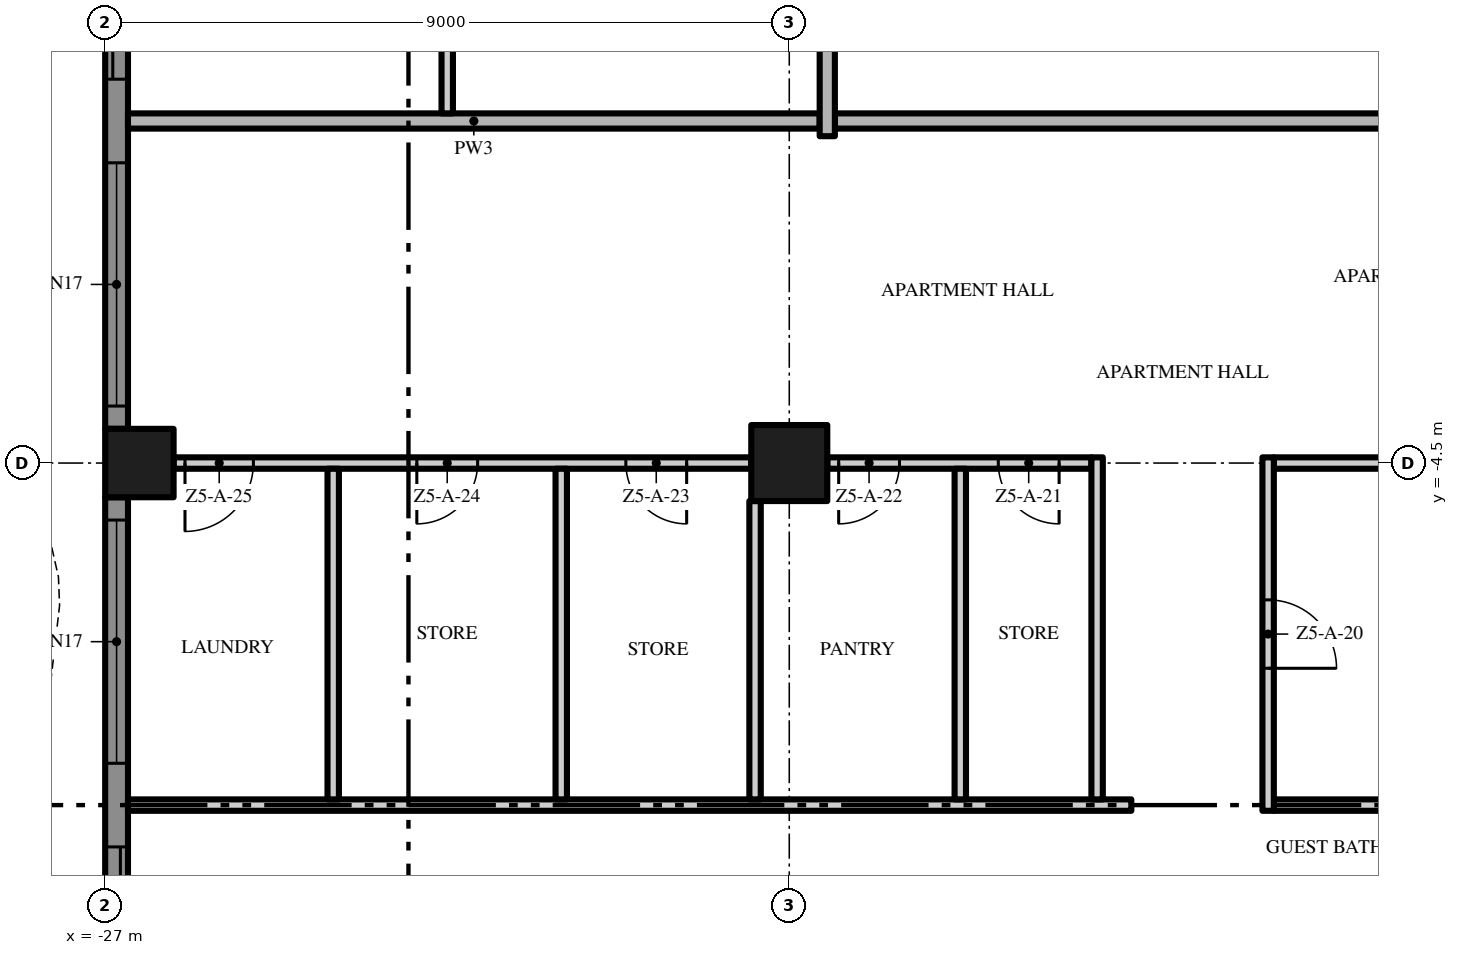
"""IFC4 building model, lengths in metres.
Left out: names, types, materials, properties, quantities, classifications, styles, units other than length and angle.
Written with IfcOpenShell. Run it as: python <this file> out.ifc"""

import sys

from ifc_helpers import new_model, si_unit, direction, frame, frame_2d, origin, origin_2d, place, context, subcontext, project, spatial, polyline, rectangle, outline, extrude, element, fill, save


model = new_model("IFC4")
c1 = context("Model", 3, precision=1e-05, world=origin(), true_north=direction((0.0, 1.0)))
c2 = subcontext(c1, "Body", "Model", "MODEL_VIEW")
j1 = project(units=[si_unit("LENGTHUNIT", "METRE"), si_unit("PLANEANGLEUNIT", "RADIAN")], contexts=[c1])
p1 = place(None, origin())
s1 = spatial("IfcSite", under=j1, at=p1, CompositionType="ELEMENT")
p2 = place(p1, origin())
s2 = spatial("IfcBuilding", under=s1, at=p2, CompositionType="ELEMENT")
p3 = place(p2, frame((0.0, 0.0, 246.4)))
s3 = spatial("IfcBuildingStorey", under=s2, at=p3, CompositionType="ELEMENT", Elevation=246.4)
p4 = place(p3, frame((-18.0, -4.5, 0.0), z_axis=(0.0, 0.0, 1.0), x_axis=(1.0, 0.0, 0.0)))
e1 = element("IfcColumn", 1, at=p4, inside=s3, PredefinedType="COLUMN", context=c2, shape_type="SweptSolid", body=[
    extrude(rectangle(XDim=1.0, YDim=1.0, at=origin_2d()), origin(), (0.0, 0.0, 1.0), 3.5),
])
p5 = place(p3, frame((-26.55, -4.5, 0.0), z_axis=(0.0, 0.0, 1.0), x_axis=(1.0, 0.0, 0.0)))
e2 = element("IfcColumn", 2, at=p5, inside=s3, PredefinedType="COLUMN", context=c2, shape_type="SweptSolid", body=[
    extrude(rectangle(XDim=0.9, YDim=0.9, at=origin_2d()), origin(), (0.0, 0.0, 1.0), 3.5),
])
p6 = place(p3, frame((-26.85, -4.05, 0.0), z_axis=(0.0, 0.0, 1.0), x_axis=(0.0, 1.0, 0.0)))
e3 = element("IfcWall", 3, at=p6, inside=s3, PredefinedType="SOLIDWALL", context=c2, shape_type="SweptSolid", body=[
    extrude(rectangle(XDim=8.1, YDim=0.3, at=frame_2d((4.05, 0.0))), origin(), (0.0, 0.0, 1.0), 3.5),
])
p7 = place(p6, frame((4.6, 0.0, 0.0)))
e4 = element("IfcOpeningElement", 4, at=p7, cuts=e3, PredefinedType="OPENING", context=c2, shape_type="SweptSolid", body=[
    extrude(rectangle(XDim=3.2, YDim=2.4, at=frame_2d((1.6, 1.2))), frame((0.0, 0.16, 0.0), z_axis=(0.0, -1.0, 0.0), x_axis=(1.0, 0.0, 0.0)), (0.0, 0.0, 1.0), 0.32),
])
p8 = place(p6, frame((0.3, 0.0, 0.45)))
e5 = element("IfcOpeningElement", 5, at=p8, cuts=e3, PredefinedType="OPENING", context=c2, shape_type="SweptSolid", body=[
    extrude(rectangle(XDim=3.2, YDim=2.65, at=frame_2d((1.6, 1.325))), frame((0.0, 0.16, 0.0), z_axis=(0.0, -1.0, 0.0), x_axis=(1.0, 0.0, 0.0)), (0.0, 0.0, 1.0), 0.32),
])
p9 = place(p3, frame((-26.85, -13.05, 0.0), z_axis=(0.0, 0.0, 1.0), x_axis=(0.0, 1.0, 0.0)))
e6 = element("IfcWall", 6, at=p9, inside=s3, PredefinedType="SOLIDWALL", context=c2, shape_type="SweptSolid", body=[
    extrude(rectangle(XDim=8.1, YDim=0.3, at=frame_2d((4.05, 0.0))), origin(), (0.0, 0.0, 1.0), 3.5),
])
p10 = place(p9, frame((4.6, 0.0, 0.45)))
e7 = element("IfcOpeningElement", 7, at=p10, cuts=e6, PredefinedType="OPENING", context=c2, shape_type="SweptSolid", body=[
    extrude(rectangle(XDim=3.2, YDim=2.65, at=frame_2d((1.6, 1.325))), frame((0.0, 0.16, 0.0), z_axis=(0.0, -1.0, 0.0), x_axis=(1.0, 0.0, 0.0)), (0.0, 0.0, 1.0), 0.32),
])
p11 = place(p9, frame((0.3, 0.0, 0.0)))
e8 = element("IfcOpeningElement", 8, at=p11, cuts=e6, PredefinedType="OPENING", context=c2, shape_type="SweptSolid", body=[
    extrude(rectangle(XDim=3.2, YDim=2.4, at=frame_2d((1.6, 1.2))), frame((0.0, 0.16, 0.0), z_axis=(0.0, -1.0, 0.0), x_axis=(1.0, 0.0, 0.0)), (0.0, 0.0, 1.0), 0.32),
])
p12 = place(p3, origin())
e9 = element("IfcWall", 9, at=p12, inside=s3, PredefinedType="USERDEFINED", context=c2, shape_type="SweptSolid", body=[
    extrude(outline(polyline([(-29.649, 18.0), (-29.985, 16.5), (-30.0, 16.125), (-29.869, 15.0), (-29.345, 13.5), (-28.612, 12.0), (-27.951, 10.5), (-27.615, 9.0), (-27.6, 8.625), (-27.731, 7.5), (-28.255, 6.0), (-28.988, 4.5), (-29.649, 3.0), (-29.985, 1.5), (-30.0, 1.125), (-29.869, 0.0), (-29.345, -1.5), (-28.612, -3.0), (-27.951, -4.5), (-27.615, -6.0), (-27.6, -6.375), (-27.731, -7.5), (-28.255, -9.0), (-28.988, -10.5), (-29.649, -12.0), (-29.985, -13.5), (-30.0, -13.875), (-29.869, -15.0), (-29.345, -16.5), (-28.612, -18.0), (-28.388, -17.89), (-29.114, -16.404), (-29.624, -14.944), (-29.749, -13.865), (-29.736, -13.533), (-29.41, -12.079), (-28.761, -10.605), (-28.024, -9.096), (-27.486, -7.556), (-27.349, -6.385), (-27.366, -5.967), (-27.713, -4.421), (-28.385, -2.895), (-29.114, -1.404), (-29.624, 0.056), (-29.749, 1.135), (-29.736, 1.467), (-29.41, 2.921), (-28.761, 4.395), (-28.024, 5.904), (-27.486, 7.444), (-27.349, 8.615), (-27.366, 9.033), (-27.713, 10.579), (-28.385, 12.105), (-29.114, 13.596), (-29.624, 15.056), (-29.749, 16.135), (-29.736, 16.467), (-29.405, 17.945), (-29.649, 18.0)])), origin(), (0.0, 0.0, 1.0), 0.9),
])
p13 = place(p3, frame((-26.7, -9.0, 0.0), z_axis=(0.0, 0.0, 1.0), x_axis=(1.0, 0.0, 0.0)))
e10 = element("IfcWall", 10, at=p13, inside=s3, PredefinedType="PARTITIONING", context=c2, shape_type="SweptSolid", body=[
    extrude(rectangle(XDim=13.2, YDim=0.15, at=frame_2d((6.6, 0.0))), origin(), (0.0, 0.0, 1.0), 3.5),
])
p14 = place(p3, frame((-11.625, -9.0, 0.0), z_axis=(0.0, 0.0, 1.0), x_axis=(1.0, 0.0, 0.0)))
e11 = element("IfcWall", 11, at=p14, inside=s3, PredefinedType="PARTITIONING", context=c2, shape_type="SweptSolid", body=[
    extrude(rectangle(XDim=11.525, YDim=0.15, at=frame_2d((5.763, 0.0))), origin(), (0.0, 0.0, 1.0), 3.5),
])
p15 = place(p14, frame((4.675, 0.0, 0.0)))
e12 = element("IfcOpeningElement", 12, at=p15, cuts=e11, PredefinedType="OPENING", context=c2, shape_type="SweptSolid", body=[
    extrude(rectangle(XDim=1.0, YDim=2.4, at=frame_2d((0.5, 1.2))), frame((0.0, 0.085, 0.0), z_axis=(0.0, -1.0, 0.0), x_axis=(1.0, 0.0, 0.0)), (0.0, 0.0, 1.0), 0.17),
])
p16 = place(p3, frame((-18.5, -4.5, 0.0), z_axis=(0.0, 0.0, 1.0), x_axis=(-1.0, 0.0, 0.0)))
e13 = element("IfcWall", 13, at=p16, inside=s3, PredefinedType="PARTITIONING", context=c2, shape_type="SweptSolid", body=[
    extrude(rectangle(XDim=7.6, YDim=0.15, at=frame_2d((3.8, 0.0))), origin(), (0.0, 0.0, 1.0), 3.5),
])
p17 = place(p16, frame((0.85, 0.0, 0.0)))
e14 = element("IfcOpeningElement", 14, at=p17, cuts=e13, PredefinedType="OPENING", context=c2, shape_type="SweptSolid", body=[
    extrude(rectangle(XDim=0.8, YDim=2.0, at=frame_2d((0.4, 1.0))), frame((0.0, 0.085, 0.0), z_axis=(0.0, -1.0, 0.0), x_axis=(1.0, 0.0, 0.0)), (0.0, 0.0, 1.0), 0.17),
])
p18 = place(p16, frame((3.6, 0.0, 0.0)))
e15 = element("IfcOpeningElement", 15, at=p18, cuts=e13, PredefinedType="OPENING", context=c2, shape_type="SweptSolid", body=[
    extrude(rectangle(XDim=0.8, YDim=2.0, at=frame_2d((0.4, 1.0))), frame((0.0, 0.085, 0.0), z_axis=(0.0, -1.0, 0.0), x_axis=(1.0, 0.0, 0.0)), (0.0, 0.0, 1.0), 0.17),
])
p19 = place(p16, frame((6.55, 0.0, 0.0)))
e16 = element("IfcOpeningElement", 16, at=p19, cuts=e13, PredefinedType="OPENING", context=c2, shape_type="SweptSolid", body=[
    extrude(rectangle(XDim=0.9, YDim=2.1, at=frame_2d((0.45, 1.05))), frame((0.0, 0.085, 0.0), z_axis=(0.0, -1.0, 0.0), x_axis=(1.0, 0.0, 0.0)), (0.0, 0.0, 1.0), 0.17),
])
p20 = place(p3, frame((-14.025, -4.5, 0.0), z_axis=(0.0, 0.0, 1.0), x_axis=(-1.0, 0.0, 0.0)))
e17 = element("IfcWall", 17, at=p20, inside=s3, PredefinedType="PARTITIONING", context=c2, shape_type="SweptSolid", body=[
    extrude(rectangle(XDim=3.475, YDim=0.15, at=frame_2d((1.738, 0.0))), origin(), (0.0, 0.0, 1.0), 3.5),
])
p21 = place(p20, frame((0.425, 0.0, 0.0)))
e18 = element("IfcOpeningElement", 18, at=p21, cuts=e17, PredefinedType="OPENING", context=c2, shape_type="SweptSolid", body=[
    extrude(rectangle(XDim=0.8, YDim=2.0, at=frame_2d((0.4, 1.0))), frame((0.0, 0.085, 0.0), z_axis=(0.0, -1.0, 0.0), x_axis=(1.0, 0.0, 0.0)), (0.0, 0.0, 1.0), 0.17),
])
p22 = place(p20, frame((2.525, 0.0, 0.0)))
e19 = element("IfcOpeningElement", 19, at=p22, cuts=e17, PredefinedType="OPENING", context=c2, shape_type="SweptSolid", body=[
    extrude(rectangle(XDim=0.8, YDim=2.0, at=frame_2d((0.4, 1.0))), frame((0.0, 0.085, 0.0), z_axis=(0.0, -1.0, 0.0), x_axis=(1.0, 0.0, 0.0)), (0.0, 0.0, 1.0), 0.17),
])
p23 = place(p3, frame((-11.625, -4.5, 0.0), z_axis=(0.0, 0.0, 1.0), x_axis=(1.0, 0.0, 0.0)))
e20 = element("IfcWall", 20, at=p23, inside=s3, PredefinedType="PARTITIONING", context=c2, shape_type="SweptSolid", body=[
    extrude(rectangle(XDim=2.125, YDim=0.15, at=frame_2d((1.062, 0.0))), origin(), (0.0, 0.0, 1.0), 3.5),
])
p24 = place(p3, frame((17.4, 0.0, 0.0), z_axis=(0.0, 0.0, 1.0), x_axis=(-1.0, 0.0, 0.0)))
e21 = element("IfcWall", 21, at=p24, inside=s3, PredefinedType="PARTITIONING", context=c2, shape_type="SweptSolid", body=[
    extrude(rectangle(XDim=34.8, YDim=0.2, at=frame_2d((17.4, 0.0))), origin(), (0.0, 0.0, 1.0), 3.5),
])
p25 = place(p24, frame((25.65, 0.0, 0.0)))
e22 = element("IfcOpeningElement", 22, at=p25, cuts=e21, PredefinedType="OPENING", context=c2, shape_type="SweptSolid", body=[
    extrude(rectangle(XDim=1.5, YDim=2.4, at=frame_2d((0.75, 1.2))), frame((0.0, 0.11, 0.0), z_axis=(0.0, -1.0, 0.0), x_axis=(1.0, 0.0, 0.0)), (0.0, 0.0, 1.0), 0.22),
])
p26 = place(p24, frame((7.65, 0.0, 0.0)))
e23 = element("IfcOpeningElement", 23, at=p26, cuts=e21, PredefinedType="OPENING", context=c2, shape_type="SweptSolid", body=[
    extrude(rectangle(XDim=1.5, YDim=2.4, at=frame_2d((0.75, 1.2))), frame((0.0, 0.11, 0.0), z_axis=(0.0, -1.0, 0.0), x_axis=(1.0, 0.0, 0.0)), (0.0, 0.0, 1.0), 0.22),
])
p27 = place(p3, frame((-26.7, 0.0, 0.0), z_axis=(0.0, 0.0, 1.0), x_axis=(1.0, 0.0, 0.0)))
e24 = element("IfcWall", 24, at=p27, inside=s3, PredefinedType="PARTITIONING", context=c2, shape_type="SweptSolid", body=[
    extrude(rectangle(XDim=9.1, YDim=0.2, at=frame_2d((4.55, 0.0))), origin(), (0.0, 0.0, 1.0), 3.5),
])
p28 = place(p3, frame((-24.0, -8.925, 0.0), z_axis=(0.0, 0.0, 1.0), x_axis=(0.0, 1.0, 0.0)))
e25 = element("IfcWall", 25, at=p28, inside=s3, PredefinedType="PARTITIONING", context=c2, shape_type="SweptSolid", body=[
    extrude(rectangle(XDim=4.35, YDim=0.15, at=frame_2d((2.175, 0.0))), origin(), (0.0, 0.0, 1.0), 3.5),
])
p29 = place(p3, frame((-22.5, 0.1, 0.0), z_axis=(0.0, 0.0, 1.0), x_axis=(0.0, 1.0, 0.0)))
e26 = element("IfcWall", 26, at=p29, inside=s3, PredefinedType="PARTITIONING", context=c2, shape_type="SweptSolid", body=[
    extrude(rectangle(XDim=17.45, YDim=0.15, at=frame_2d((8.725, 0.0))), origin(), (0.0, 0.0, 1.0), 3.5),
])
p30 = place(p29, frame((1.65, 0.0, 0.0)))
e27 = element("IfcOpeningElement", 27, at=p30, cuts=e26, PredefinedType="OPENING", context=c2, shape_type="SweptSolid", body=[
    extrude(rectangle(XDim=1.0, YDim=2.4, at=frame_2d((0.5, 1.2))), frame((0.0, 0.085, 0.0), z_axis=(0.0, -1.0, 0.0), x_axis=(1.0, 0.0, 0.0)), (0.0, 0.0, 1.0), 0.17),
])
p31 = place(p29, frame((5.0, 0.0, 0.0)))
e28 = element("IfcOpeningElement", 28, at=p31, cuts=e26, PredefinedType="OPENING", context=c2, shape_type="SweptSolid", body=[
    extrude(rectangle(XDim=1.0, YDim=2.4, at=frame_2d((0.5, 1.2))), frame((0.0, 0.085, 0.0), z_axis=(0.0, -1.0, 0.0), x_axis=(1.0, 0.0, 0.0)), (0.0, 0.0, 1.0), 0.17),
])
p32 = place(p29, frame((11.4, 0.0, 0.0)))
e29 = element("IfcOpeningElement", 29, at=p32, cuts=e26, PredefinedType="OPENING", context=c2, shape_type="SweptSolid", body=[
    extrude(rectangle(XDim=1.8, YDim=2.4, at=frame_2d((0.9, 1.2))), frame((0.0, 0.085, 0.0), z_axis=(0.0, -1.0, 0.0), x_axis=(1.0, 0.0, 0.0)), (0.0, 0.0, 1.0), 0.17),
])
p33 = place(p3, frame((-21.0, -8.925, 0.0), z_axis=(0.0, 0.0, 1.0), x_axis=(0.0, 1.0, 0.0)))
e30 = element("IfcWall", 30, at=p33, inside=s3, PredefinedType="PARTITIONING", context=c2, shape_type="SweptSolid", body=[
    extrude(rectangle(XDim=4.35, YDim=0.15, at=frame_2d((2.175, 0.0))), origin(), (0.0, 0.0, 1.0), 3.5),
])
p34 = place(p3, frame((-18.45, -8.925, 0.0), z_axis=(0.0, 0.0, 1.0), x_axis=(0.0, 1.0, 0.0)))
e31 = element("IfcWall", 31, at=p34, inside=s3, PredefinedType="PARTITIONING", context=c2, shape_type="SweptSolid", body=[
    extrude(rectangle(XDim=3.925, YDim=0.15, at=frame_2d((1.962, 0.0))), origin(), (0.0, 0.0, 1.0), 3.5),
])
p35 = place(p3, frame((-17.5, -0.2, 0.0), z_axis=(0.0, 0.0, 1.0), x_axis=(0.0, 1.0, 0.0)))
e32 = element("IfcWall", 32, at=p35, inside=s3, PredefinedType="PARTITIONING", context=c2, shape_type="SweptSolid", body=[
    extrude(rectangle(XDim=4.2, YDim=0.2, at=frame_2d((2.1, 0.0))), origin(), (0.0, 0.0, 1.0), 3.5),
])
p36 = place(p3, frame((-15.75, -8.925, 0.0), z_axis=(0.0, 0.0, 1.0), x_axis=(0.0, 1.0, 0.0)))
e33 = element("IfcWall", 33, at=p36, inside=s3, PredefinedType="PARTITIONING", context=c2, shape_type="SweptSolid", body=[
    extrude(rectangle(XDim=4.35, YDim=0.15, at=frame_2d((2.175, 0.0))), origin(), (0.0, 0.0, 1.0), 3.5),
])
p37 = place(p3, frame((-13.95, -8.925, 0.0), z_axis=(0.0, 0.0, 1.0), x_axis=(0.0, 1.0, 0.0)))
e34 = element("IfcWall", 34, at=p37, inside=s3, PredefinedType="PARTITIONING", context=c2, shape_type="SweptSolid", body=[
    extrude(rectangle(XDim=4.5, YDim=0.15, at=frame_2d((2.25, 0.0))), origin(), (0.0, 0.0, 1.0), 3.5),
])
p38 = place(p3, frame((-11.7, -4.425, 0.0), z_axis=(0.0, 0.0, 1.0), x_axis=(0.0, -1.0, 0.0)))
e35 = element("IfcWall", 35, at=p38, inside=s3, PredefinedType="PARTITIONING", context=c2, shape_type="SweptSolid", body=[
    extrude(rectangle(XDim=4.65, YDim=0.15, at=frame_2d((2.325, 0.0))), origin(), (0.0, 0.0, 1.0), 3.5),
])
p39 = place(p38, frame((1.875, 0.0, 0.0)))
e36 = element("IfcOpeningElement", 36, at=p39, cuts=e35, PredefinedType="OPENING", context=c2, shape_type="SweptSolid", body=[
    extrude(rectangle(XDim=0.9, YDim=2.1, at=frame_2d((0.45, 1.05))), frame((0.0, 0.085, 0.0), z_axis=(0.0, -1.0, 0.0), x_axis=(1.0, 0.0, 0.0)), (0.0, 0.0, 1.0), 0.17),
])
p40 = place(p7, origin())
e37 = element("IfcDoor", 37, at=p40, inside=s3, OperationType="SINGLE_SWING_LEFT", PredefinedType="DOOR", context=c2, shape_type="SweptSolid", body=[
    extrude(rectangle(XDim=3.2, YDim=2.4, at=frame_2d((1.6, 1.2))), frame((0.0, 0.025, 0.0), z_axis=(0.0, -1.0, 0.0), x_axis=(1.0, 0.0, 0.0)), (0.0, 0.0, 1.0), 0.05),
])
fill(e4, e37)
p41 = place(p8, origin())
e38 = element("IfcWindow", 38, at=p41, inside=s3, PartitioningType="SINGLE_PANEL", PredefinedType="WINDOW", context=c2, shape_type="SweptSolid", body=[
    extrude(rectangle(XDim=3.2, YDim=2.65, at=frame_2d((1.6, 1.325))), frame((0.0, 0.03, 0.0), z_axis=(0.0, -1.0, 0.0), x_axis=(1.0, 0.0, 0.0)), (0.0, 0.0, 1.0), 0.06),
])
fill(e5, e38)
p42 = place(p10, origin())
e39 = element("IfcWindow", 39, at=p42, inside=s3, PartitioningType="SINGLE_PANEL", PredefinedType="WINDOW", context=c2, shape_type="SweptSolid", body=[
    extrude(rectangle(XDim=3.2, YDim=2.65, at=frame_2d((1.6, 1.325))), frame((0.0, 0.03, 0.0), z_axis=(0.0, -1.0, 0.0), x_axis=(1.0, 0.0, 0.0)), (0.0, 0.0, 1.0), 0.06),
])
fill(e7, e39)
p43 = place(p11, origin())
e40 = element("IfcDoor", 40, at=p43, inside=s3, OperationType="SINGLE_SWING_LEFT", PredefinedType="DOOR", context=c2, shape_type="SweptSolid", body=[
    extrude(rectangle(XDim=3.2, YDim=2.4, at=frame_2d((1.6, 1.2))), frame((0.0, 0.025, 0.0), z_axis=(0.0, -1.0, 0.0), x_axis=(1.0, 0.0, 0.0)), (0.0, 0.0, 1.0), 0.05),
])
fill(e8, e40)
p44 = place(p39, origin())
e41 = element("IfcDoor", 41, at=p44, inside=s3, OperationType="SINGLE_SWING_RIGHT", PredefinedType="DOOR", context=c2, shape_type="SweptSolid", body=[
    extrude(rectangle(XDim=0.9, YDim=2.1, at=frame_2d((0.45, 1.05))), frame((0.0, 0.025, 0.0), z_axis=(0.0, -1.0, 0.0), x_axis=(1.0, 0.0, 0.0)), (0.0, 0.0, 1.0), 0.05),
])
fill(e36, e41)
p45 = place(p21, origin())
e42 = element("IfcDoor", 42, at=p45, inside=s3, OperationType="SINGLE_SWING_LEFT", PredefinedType="DOOR", context=c2, shape_type="SweptSolid", body=[
    extrude(rectangle(XDim=0.8, YDim=2.0, at=frame_2d((0.4, 1.0))), frame((0.0, 0.025, 0.0), z_axis=(0.0, -1.0, 0.0), x_axis=(1.0, 0.0, 0.0)), (0.0, 0.0, 1.0), 0.05),
])
fill(e18, e42)
p46 = place(p22, origin())
e43 = element("IfcDoor", 43, at=p46, inside=s3, OperationType="SINGLE_SWING_RIGHT", PredefinedType="DOOR", context=c2, shape_type="SweptSolid", body=[
    extrude(rectangle(XDim=0.8, YDim=2.0, at=frame_2d((0.4, 1.0))), frame((0.0, 0.025, 0.0), z_axis=(0.0, -1.0, 0.0), x_axis=(1.0, 0.0, 0.0)), (0.0, 0.0, 1.0), 0.05),
])
fill(e19, e43)
p47 = place(p17, origin())
e44 = element("IfcDoor", 44, at=p47, inside=s3, OperationType="SINGLE_SWING_LEFT", PredefinedType="DOOR", context=c2, shape_type="SweptSolid", body=[
    extrude(rectangle(XDim=0.8, YDim=2.0, at=frame_2d((0.4, 1.0))), frame((0.0, 0.025, 0.0), z_axis=(0.0, -1.0, 0.0), x_axis=(1.0, 0.0, 0.0)), (0.0, 0.0, 1.0), 0.05),
])
fill(e14, e44)
p48 = place(p18, origin())
e45 = element("IfcDoor", 45, at=p48, inside=s3, OperationType="SINGLE_SWING_RIGHT", PredefinedType="DOOR", context=c2, shape_type="SweptSolid", body=[
    extrude(rectangle(XDim=0.8, YDim=2.0, at=frame_2d((0.4, 1.0))), frame((0.0, 0.025, 0.0), z_axis=(0.0, -1.0, 0.0), x_axis=(1.0, 0.0, 0.0)), (0.0, 0.0, 1.0), 0.05),
])
fill(e15, e45)
p49 = place(p19, origin())
e46 = element("IfcDoor", 46, at=p49, inside=s3, OperationType="SINGLE_SWING_RIGHT", PredefinedType="DOOR", context=c2, shape_type="SweptSolid", body=[
    extrude(rectangle(XDim=0.9, YDim=2.1, at=frame_2d((0.45, 1.05))), frame((0.0, 0.025, 0.0), z_axis=(0.0, -1.0, 0.0), x_axis=(1.0, 0.0, 0.0)), (0.0, 0.0, 1.0), 0.05),
])
fill(e16, e46)
save(model, sys.argv[1])
